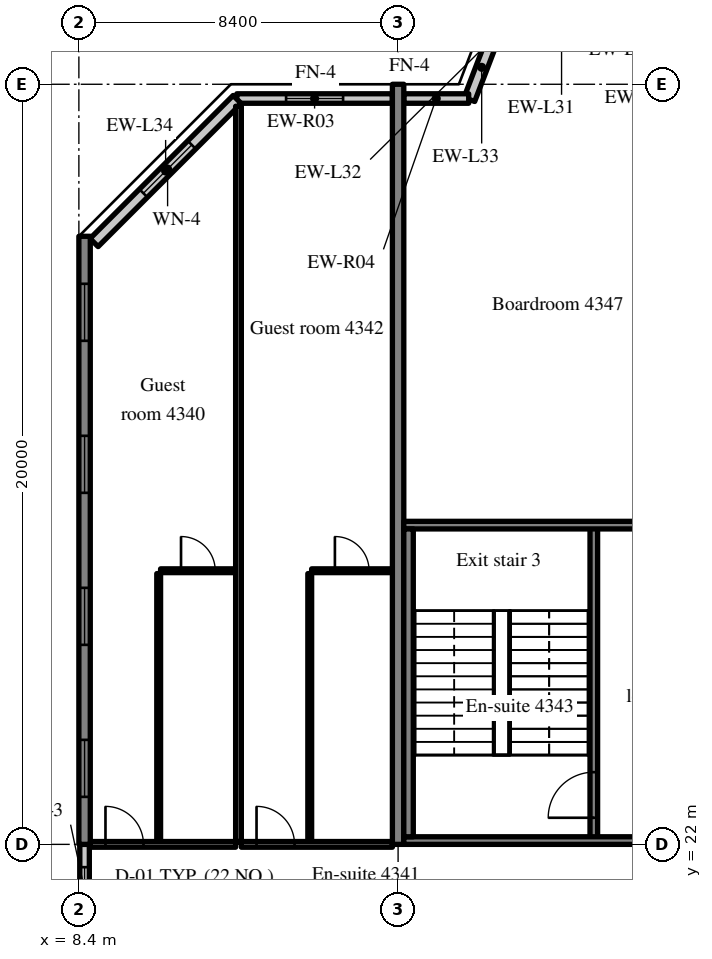
"""IFC4 building model, lengths in metres.
Left out: names, types, materials, properties, quantities, classifications, styles, units other than length and angle.
Written with IfcOpenShell. Run it as: python <this file> out.ifc"""

import sys

from ifc_helpers import new_model, si_unit, direction, frame, frame_2d, origin, place, context, subcontext, project, spatial, rectangle, extrude, source, transform, mapped, element, fill, save


model = new_model("IFC4")
c1 = context("Model", 3, precision=1e-05, world=origin(), true_north=direction((0.0, 1.0)))
c2 = subcontext(c1, "Body", "Model", "MODEL_VIEW")
j1 = project(units=[si_unit("LENGTHUNIT", "METRE"), si_unit("PLANEANGLEUNIT", "RADIAN")], contexts=[c1])
p1 = place(None, origin())
s1 = spatial("IfcSite", under=j1, at=p1, CompositionType="ELEMENT")
p2 = place(p1, origin())
s2 = spatial("IfcBuilding", under=s1, at=p2, CompositionType="ELEMENT")
p3 = place(p2, frame((0.0, 0.0, 178.2)))
s3 = spatial("IfcBuildingStorey", under=s2, at=p3, CompositionType="ELEMENT", Elevation=178.2)
m1 = source(origin(), c2, "Body", "SweptSolid", [
    extrude(rectangle(XDim=16.0, YDim=0.3, at=frame_2d((8.0, 0.0))), origin(), (0.0, 0.0, 1.0), 3.52),
])
p4 = place(p3, frame((8.55, 22.0, 0.0), z_axis=(0.0, 0.0, 1.0), x_axis=(0.0, 1.0, 0.0)))
e1 = element("IfcWall", 1, at=p4, inside=s3, PredefinedType="SHEAR", context=c2, shape_type="MappedRepresentation", body=[
    mapped(m1, transform((0.0, 0.0, 0.0), scale=1.0)),
])
m2 = source(origin(), c2, "Body", "SweptSolid", [
    extrude(rectangle(XDim=1.5, YDim=1.5, at=frame_2d((0.75, 0.75))), frame((0.0, 0.16, 0.0), z_axis=(0.0, -1.0, 0.0), x_axis=(1.0, 0.0, 0.0)), (0.0, 0.0, 1.0), 0.32),
])
p5 = place(p4, frame((1.25, 0.0, 0.9)))
e2 = element("IfcOpeningElement", 2, at=p5, cuts=e1, PredefinedType="OPENING", context=c2, shape_type="MappedRepresentation", body=[
    mapped(m2, transform((0.0, 0.0, 0.0), scale=1.0)),
])
p6 = place(p4, frame((5.25, 0.0, 0.9)))
e3 = element("IfcOpeningElement", 3, at=p6, cuts=e1, PredefinedType="OPENING", context=c2, shape_type="MappedRepresentation", body=[
    mapped(m2, transform((0.0, 0.0, 0.0), scale=1.0)),
])
p7 = place(p4, frame((9.25, 0.0, 0.9)))
e4 = element("IfcOpeningElement", 4, at=p7, cuts=e1, PredefinedType="OPENING", context=c2, shape_type="MappedRepresentation", body=[
    mapped(m2, transform((0.0, 0.0, 0.0), scale=1.0)),
])
p8 = place(p4, frame((13.25, 0.0, 0.9)))
e5 = element("IfcOpeningElement", 5, at=p8, cuts=e1, PredefinedType="OPENING", context=c2, shape_type="MappedRepresentation", body=[
    mapped(m2, transform((0.0, 0.0, 0.0), scale=1.0)),
])
m3 = source(origin(), c2, "Body", "SweptSolid", [
    extrude(rectangle(XDim=20.0, YDim=0.3, at=frame_2d((10.0, 0.0))), origin(), (0.0, 0.0, 1.0), 3.52),
])
p9 = place(p3, frame((16.8, 22.0, 0.0), z_axis=(0.0, 0.0, 1.0), x_axis=(0.0, 1.0, 0.0)))
e6 = element("IfcWall", 6, at=p9, inside=s3, PredefinedType="SHEAR", context=c2, shape_type="MappedRepresentation", body=[
    mapped(m3, transform((0.0, 0.0, 0.0), scale=1.0)),
])
m4 = source(origin(), c2, "Body", "SweptSolid", [
    extrude(rectangle(XDim=1.812, YDim=0.3, at=frame_2d((0.906, 0.0))), origin(), (0.0, 0.0, 1.0), 3.52),
])
p10 = place(p3, frame((19.323, 43.292, 0.0), z_axis=(0.0, 0.0, 1.0), x_axis=(-0.357877270961, -0.93376863244, 0.0)))
e7 = element("IfcWall", 7, at=p10, inside=s3, PredefinedType="SOLIDWALL", context=c2, shape_type="MappedRepresentation", body=[
    mapped(m4, transform((0.0, 0.0, 0.0), scale=1.0)),
])
m5 = source(origin(), c2, "Body", "SweptSolid", [
    extrude(rectangle(XDim=4.094, YDim=0.25, at=frame_2d((2.047, 0.0))), origin(), (0.0, 0.0, 1.0), 2.87),
])
p11 = place(p3, frame((16.65, 41.625, 0.0), z_axis=(0.0, 0.0, 1.0), x_axis=(-1.0, 0.0, 0.0)))
e8 = element("IfcWall", 8, at=p11, inside=s3, PredefinedType="SOLIDWALL", context=c2, shape_type="MappedRepresentation", body=[
    mapped(m5, transform((0.0, 0.0, 0.0), scale=1.0)),
])
m6 = source(origin(), c2, "Body", "SweptSolid", [
    extrude(rectangle(XDim=1.5, YDim=1.5, at=frame_2d((0.75, 0.75))), frame((0.0, 0.135, 0.0), z_axis=(0.0, -1.0, 0.0), x_axis=(1.0, 0.0, 0.0)), (0.0, 0.0, 1.0), 0.27),
])
p12 = place(p11, frame((1.297, 0.0, 0.9)))
e9 = element("IfcOpeningElement", 9, at=p12, cuts=e8, PredefinedType="OPENING", context=c2, shape_type="MappedRepresentation", body=[
    mapped(m6, transform((0.0, 0.0, 0.0), scale=1.0)),
])
m7 = source(origin(), c2, "Body", "SweptSolid", [
    extrude(rectangle(XDim=1.708, YDim=0.25, at=frame_2d((0.854, 0.0))), origin(), (0.0, 0.0, 1.0), 2.87),
])
p13 = place(p3, frame((18.658, 41.625, 0.0), z_axis=(0.0, 0.0, 1.0), x_axis=(-1.0, 0.0, 0.0)))
e10 = element("IfcWall", 10, at=p13, inside=s3, PredefinedType="SOLIDWALL", context=c2, shape_type="MappedRepresentation", body=[
    mapped(m7, transform((0.0, 0.0, 0.0), scale=1.0)),
])
m8 = source(origin(), c2, "Body", "SweptSolid", [
    extrude(rectangle(XDim=5.326, YDim=0.3, at=frame_2d((2.663, 0.0))), origin(), (0.0, 0.0, 1.0), 3.52),
])
p14 = place(p3, frame((12.566, 41.6, 0.0), z_axis=(0.0, 0.0, 1.0), x_axis=(-0.707083859269, -0.707129702361, 0.0)))
e11 = element("IfcWall", 11, at=p14, inside=s3, PredefinedType="SOLIDWALL", context=c2, shape_type="MappedRepresentation", body=[
    mapped(m8, transform((0.0, 0.0, 0.0), scale=1.0)),
])
m9 = source(origin(), c2, "Body", "SweptSolid", [
    extrude(rectangle(XDim=1.8, YDim=1.5, at=frame_2d((0.9, 0.75))), frame((0.0, 0.16, 0.0), z_axis=(0.0, -1.0, 0.0), x_axis=(1.0, 0.0, 0.0)), (0.0, 0.0, 1.0), 0.32),
])
p15 = place(p14, frame((1.689, 0.0, 0.9)))
e12 = element("IfcOpeningElement", 12, at=p15, cuts=e11, PredefinedType="OPENING", context=c2, shape_type="MappedRepresentation", body=[
    mapped(m9, transform((0.0, 0.0, 0.0), scale=1.0)),
])
m10 = source(origin(), c2, "Body", "SweptSolid", [
    extrude(rectangle(XDim=2.4, YDim=0.25, at=frame_2d((1.2, 0.0))), origin(), (0.0, 0.0, 1.0), 2.62),
])
p16 = place(p3, frame((8.55, 19.6, 0.0), z_axis=(0.0, 0.0, 1.0), x_axis=(0.0, 1.0, 0.0)))
e13 = element("IfcWall", 13, at=p16, inside=s3, PredefinedType="SOLIDWALL", context=c2, shape_type="MappedRepresentation", body=[
    mapped(m10, transform((0.0, 0.0, 0.0), scale=1.0)),
])
m11 = source(origin(), c2, "Body", "SweptSolid", [
    extrude(rectangle(XDim=1.2, YDim=1.5, at=frame_2d((0.6, 0.75))), frame((0.0, 0.135, 0.0), z_axis=(0.0, -1.0, 0.0), x_axis=(1.0, 0.0, 0.0)), (0.0, 0.0, 1.0), 0.27),
])
p17 = place(p16, frame((0.6, 0.0, 0.9)))
e14 = element("IfcOpeningElement", 14, at=p17, cuts=e13, PredefinedType="OPENING", context=c2, shape_type="MappedRepresentation", body=[
    mapped(m11, transform((0.0, 0.0, 0.0), scale=1.0)),
])
m12 = source(origin(), c2, "Body", "SweptSolid", [
    extrude(rectangle(XDim=8.3, YDim=0.2, at=frame_2d((4.15, 0.0))), origin(), (0.0, 0.0, 1.0), 3.52),
])
p18 = place(p3, frame((21.95, 22.1, 0.0), z_axis=(0.0, 0.0, 1.0), x_axis=(0.0, 1.0, 0.0)))
e15 = element("IfcWall", 15, at=p18, inside=s3, PredefinedType="SOLIDWALL", context=c2, shape_type="MappedRepresentation", body=[
    mapped(m12, transform((0.0, 0.0, 0.0), scale=1.0)),
])
m13 = source(origin(), c2, "Body", "SweptSolid", [
    extrude(rectangle(XDim=1.2, YDim=2.1, at=frame_2d((0.6, 1.05))), frame((0.0, 0.11, 0.0), z_axis=(0.0, -1.0, 0.0), x_axis=(1.0, 0.0, 0.0)), (0.0, 0.0, 1.0), 0.22),
])
p19 = place(p18, frame((0.6, 0.0, 0.0)))
e16 = element("IfcOpeningElement", 16, at=p19, cuts=e15, PredefinedType="OPENING", context=c2, shape_type="MappedRepresentation", body=[
    mapped(m13, transform((0.0, 0.0, 0.0), scale=1.0)),
])
m14 = source(origin(), c2, "Body", "SweptSolid", [
    extrude(rectangle(XDim=8.25, YDim=0.2, at=frame_2d((4.125, 0.0))), origin(), (0.0, 0.0, 1.0), 3.52),
])
p20 = place(p3, frame((16.95, 22.1, 0.0), z_axis=(0.0, 0.0, 1.0), x_axis=(1.0, 0.0, 0.0)))
e17 = element("IfcWall", 17, at=p20, inside=s3, PredefinedType="SOLIDWALL", context=c2, shape_type="MappedRepresentation", body=[
    mapped(m14, transform((0.0, 0.0, 0.0), scale=1.0)),
])
p21 = place(p20, frame((6.05, 0.0, 0.0)))
e18 = element("IfcOpeningElement", 18, at=p21, cuts=e17, PredefinedType="OPENING", context=c2, shape_type="MappedRepresentation", body=[
    mapped(m13, transform((0.0, 0.0, 0.0), scale=1.0)),
])
p22 = place(p3, frame((16.95, 30.4, 0.0), z_axis=(0.0, 0.0, 1.0), x_axis=(1.0, 0.0, 0.0)))
e19 = element("IfcWall", 19, at=p22, inside=s3, PredefinedType="SOLIDWALL", context=c2, shape_type="MappedRepresentation", body=[
    mapped(m14, transform((0.0, 0.0, 0.0), scale=1.0)),
])
m15 = source(origin(), c2, "Body", "SweptSolid", [
    extrude(rectangle(XDim=1.0, YDim=2.1, at=frame_2d((0.5, 1.05))), frame((0.0, 0.11, 0.0), z_axis=(0.0, -1.0, 0.0), x_axis=(1.0, 0.0, 0.0)), (0.0, 0.0, 1.0), 0.22),
])
p23 = place(p22, frame((6.15, 0.0, 0.0)))
e20 = element("IfcOpeningElement", 20, at=p23, cuts=e19, PredefinedType="OPENING", context=c2, shape_type="MappedRepresentation", body=[
    mapped(m15, transform((0.0, 0.0, 0.0), scale=1.0)),
])
m16 = source(origin(), c2, "Body", "SweptSolid", [
    extrude(rectangle(XDim=8.1, YDim=0.25, at=frame_2d((4.05, 0.0))), origin(), (0.0, 0.0, 1.0), 3.52),
])
p24 = place(p3, frame((17.075, 22.2, 0.0), z_axis=(0.0, 0.0, 1.0), x_axis=(0.0, 1.0, 0.0)))
e21 = element("IfcWall", 21, at=p24, inside=s3, PredefinedType="SOLIDWALL", context=c2, shape_type="MappedRepresentation", body=[
    mapped(m16, transform((0.0, 0.0, 0.0), scale=1.0)),
])
m17 = source(origin(), c2, "Body", "SweptSolid", [
    extrude(rectangle(XDim=7.05, YDim=0.1, at=frame_2d((3.525, 0.0))), origin(), (0.0, 0.0, 1.0), 3.52),
])
p25 = place(p3, frame((10.5, 22.075, 0.0), z_axis=(0.0, 0.0, 1.0), x_axis=(0.0, 1.0, 0.0)))
e22 = element("IfcWall", 22, at=p25, inside=s3, PredefinedType="PARTITIONING", context=c2, shape_type="MappedRepresentation", body=[
    mapped(m17, transform((0.0, 0.0, 0.0), scale=1.0)),
])
m18 = source(origin(), c2, "Body", "SweptSolid", [
    extrude(rectangle(XDim=1.975, YDim=0.1, at=frame_2d((0.987, 0.0))), origin(), (0.0, 0.0, 1.0), 3.52),
])
p26 = place(p3, frame((10.55, 29.2, 0.0), z_axis=(0.0, 0.0, 1.0), x_axis=(1.0, 0.0, 0.0)))
e23 = element("IfcWall", 23, at=p26, inside=s3, PredefinedType="PARTITIONING", context=c2, shape_type="MappedRepresentation", body=[
    mapped(m18, transform((0.0, 0.0, 0.0), scale=1.0)),
])
m19 = source(origin(), c2, "Body", "SweptSolid", [
    extrude(rectangle(XDim=0.9, YDim=2.1, at=frame_2d((0.45, 1.05))), frame((0.0, 0.06, 0.0), z_axis=(0.0, -1.0, 0.0), x_axis=(1.0, 0.0, 0.0)), (0.0, 0.0, 1.0), 0.12),
])
p27 = place(p26, frame((0.538, 0.0, 0.0)))
e24 = element("IfcOpeningElement", 24, at=p27, cuts=e23, PredefinedType="OPENING", context=c2, shape_type="MappedRepresentation", body=[
    mapped(m19, transform((0.0, 0.0, 0.0), scale=1.0)),
])
m20 = source(origin(), c2, "Body", "SweptSolid", [
    extrude(rectangle(XDim=3.825, YDim=0.15, at=frame_2d((1.913, 0.0))), origin(), (0.0, 0.0, 1.0), 2.82),
])
p28 = place(p3, frame((8.7, 22.0, 0.0), z_axis=(0.0, 0.0, 1.0), x_axis=(1.0, 0.0, 0.0)))
e25 = element("IfcWall", 25, at=p28, inside=s3, PredefinedType="PARTITIONING", context=c2, shape_type="MappedRepresentation", body=[
    mapped(m20, transform((0.0, 0.0, 0.0), scale=1.0)),
])
m21 = source(origin(), c2, "Body", "SweptSolid", [
    extrude(rectangle(XDim=1.0, YDim=2.1, at=frame_2d((0.5, 1.05))), frame((0.0, 0.085, 0.0), z_axis=(0.0, -1.0, 0.0), x_axis=(1.0, 0.0, 0.0)), (0.0, 0.0, 1.0), 0.17),
])
p29 = place(p28, frame((0.4, 0.0, 0.0)))
e26 = element("IfcOpeningElement", 26, at=p29, cuts=e25, PredefinedType="OPENING", context=c2, shape_type="MappedRepresentation", body=[
    mapped(m21, transform((0.0, 0.0, 0.0), scale=1.0)),
])
p30 = place(p3, frame((14.475, 22.075, 0.0), z_axis=(0.0, 0.0, 1.0), x_axis=(0.0, 1.0, 0.0)))
e27 = element("IfcWall", 27, at=p30, inside=s3, PredefinedType="PARTITIONING", context=c2, shape_type="MappedRepresentation", body=[
    mapped(m17, transform((0.0, 0.0, 0.0), scale=1.0)),
])
m22 = source(origin(), c2, "Body", "SweptSolid", [
    extrude(rectangle(XDim=2.125, YDim=0.1, at=frame_2d((1.062, 0.0))), origin(), (0.0, 0.0, 1.0), 3.52),
])
p31 = place(p3, frame((14.525, 29.2, 0.0), z_axis=(0.0, 0.0, 1.0), x_axis=(1.0, 0.0, 0.0)))
e28 = element("IfcWall", 28, at=p31, inside=s3, PredefinedType="PARTITIONING", context=c2, shape_type="MappedRepresentation", body=[
    mapped(m22, transform((0.0, 0.0, 0.0), scale=1.0)),
])
p32 = place(p31, frame((0.612, 0.0, 0.0)))
e29 = element("IfcOpeningElement", 29, at=p32, cuts=e28, PredefinedType="OPENING", context=c2, shape_type="MappedRepresentation", body=[
    mapped(m19, transform((0.0, 0.0, 0.0), scale=1.0)),
])
m23 = source(origin(), c2, "Body", "SweptSolid", [
    extrude(rectangle(XDim=3.975, YDim=0.15, at=frame_2d((1.987, 0.0))), origin(), (0.0, 0.0, 1.0), 2.82),
])
p33 = place(p3, frame((12.675, 22.0, 0.0), z_axis=(0.0, 0.0, 1.0), x_axis=(1.0, 0.0, 0.0)))
e30 = element("IfcWall", 30, at=p33, inside=s3, PredefinedType="PARTITIONING", context=c2, shape_type="MappedRepresentation", body=[
    mapped(m23, transform((0.0, 0.0, 0.0), scale=1.0)),
])
p34 = place(p33, frame((0.4, 0.0, 0.0)))
e31 = element("IfcOpeningElement", 31, at=p34, cuts=e30, PredefinedType="OPENING", context=c2, shape_type="MappedRepresentation", body=[
    mapped(m21, transform((0.0, 0.0, 0.0), scale=1.0)),
])
m24 = source(origin(), c2, "Body", "SweptSolid", [
    extrude(rectangle(XDim=19.347, YDim=0.15, at=frame_2d((9.674, 0.0))), origin(), (0.0, 0.0, 1.0), 3.52),
])
p35 = place(p3, frame((12.6, 22.075, 0.0), z_axis=(0.0, 0.0, 1.0), x_axis=(0.0, 1.0, 0.0)))
e32 = element("IfcWall", 32, at=p35, inside=s3, PredefinedType="PARTITIONING", context=c2, shape_type="MappedRepresentation", body=[
    mapped(m24, transform((0.0, 0.0, 0.0), scale=1.0)),
])
m25 = source(origin(), c2, "Body", "SweptSolid", [
    extrude(rectangle(XDim=1.5, YDim=1.5, at=frame_2d((0.75, 0.75))), frame((0.0, 0.03, 0.0), z_axis=(0.0, -1.0, 0.0), x_axis=(1.0, 0.0, 0.0)), (0.0, 0.0, 1.0), 0.06),
])
p36 = place(p12, origin())
e33 = element("IfcWindow", 33, at=p36, inside=s3, PartitioningType="SINGLE_PANEL", PredefinedType="WINDOW", context=c2, shape_type="MappedRepresentation", body=[
    mapped(m25, transform((0.0, 0.0, 0.0), scale=1.0)),
])
fill(e9, e33)
m26 = source(origin(), c2, "Body", "SweptSolid", [
    extrude(rectangle(XDim=1.8, YDim=1.5, at=frame_2d((0.9, 0.75))), frame((0.0, 0.03, 0.0), z_axis=(0.0, -1.0, 0.0), x_axis=(1.0, 0.0, 0.0)), (0.0, 0.0, 1.0), 0.06),
])
p37 = place(p15, origin())
e34 = element("IfcWindow", 34, at=p37, inside=s3, PartitioningType="SINGLE_PANEL", PredefinedType="WINDOW", context=c2, shape_type="MappedRepresentation", body=[
    mapped(m26, transform((0.0, 0.0, 0.0), scale=1.0)),
])
fill(e12, e34)
p38 = place(p5, origin())
e35 = element("IfcWindow", 35, at=p38, inside=s3, PartitioningType="SINGLE_PANEL", PredefinedType="WINDOW", context=c2, shape_type="MappedRepresentation", body=[
    mapped(m25, transform((0.0, 0.0, 0.0), scale=1.0)),
])
fill(e2, e35)
p39 = place(p6, origin())
e36 = element("IfcWindow", 36, at=p39, inside=s3, PartitioningType="SINGLE_PANEL", PredefinedType="WINDOW", context=c2, shape_type="MappedRepresentation", body=[
    mapped(m25, transform((0.0, 0.0, 0.0), scale=1.0)),
])
fill(e3, e36)
p40 = place(p7, origin())
e37 = element("IfcWindow", 37, at=p40, inside=s3, PartitioningType="SINGLE_PANEL", PredefinedType="WINDOW", context=c2, shape_type="MappedRepresentation", body=[
    mapped(m25, transform((0.0, 0.0, 0.0), scale=1.0)),
])
fill(e4, e37)
p41 = place(p8, origin())
e38 = element("IfcWindow", 38, at=p41, inside=s3, PartitioningType="SINGLE_PANEL", PredefinedType="WINDOW", context=c2, shape_type="MappedRepresentation", body=[
    mapped(m25, transform((0.0, 0.0, 0.0), scale=1.0)),
])
fill(e5, e38)
m27 = source(origin(), c2, "Body", "SweptSolid", [
    extrude(rectangle(XDim=1.2, YDim=1.5, at=frame_2d((0.6, 0.75))), frame((0.0, 0.03, 0.0), z_axis=(0.0, -1.0, 0.0), x_axis=(1.0, 0.0, 0.0)), (0.0, 0.0, 1.0), 0.06),
])
p42 = place(p17, origin())
e39 = element("IfcWindow", 39, at=p42, inside=s3, PartitioningType="SINGLE_PANEL", PredefinedType="WINDOW", context=c2, shape_type="MappedRepresentation", body=[
    mapped(m27, transform((0.0, 0.0, 0.0), scale=1.0)),
])
fill(e14, e39)
m28 = source(origin(), c2, "Body", "SweptSolid", [
    extrude(rectangle(XDim=1.2, YDim=2.1, at=frame_2d((0.6, 1.05))), frame((0.0, 0.025, 0.0), z_axis=(0.0, -1.0, 0.0), x_axis=(1.0, 0.0, 0.0)), (0.0, 0.0, 1.0), 0.05),
])
p43 = place(p19, origin())
e40 = element("IfcDoor", 40, at=p43, inside=s3, OperationType="SINGLE_SWING_LEFT", PredefinedType="DOOR", context=c2, shape_type="MappedRepresentation", body=[
    mapped(m28, transform((0.0, 0.0, 0.0), scale=1.0)),
])
fill(e16, e40)
m29 = source(origin(), c2, "Body", "SweptSolid", [
    extrude(rectangle(XDim=0.9, YDim=2.1, at=frame_2d((0.45, 1.05))), frame((0.0, 0.025, 0.0), z_axis=(0.0, -1.0, 0.0), x_axis=(1.0, 0.0, 0.0)), (0.0, 0.0, 1.0), 0.05),
])
p44 = place(p27, origin())
e41 = element("IfcDoor", 41, at=p44, inside=s3, OperationType="SINGLE_SWING_LEFT", PredefinedType="DOOR", context=c2, shape_type="MappedRepresentation", body=[
    mapped(m29, transform((0.0, 0.0, 0.0), scale=1.0)),
])
fill(e24, e41)
m30 = source(origin(), c2, "Body", "SweptSolid", [
    extrude(rectangle(XDim=1.0, YDim=2.1, at=frame_2d((0.5, 1.05))), frame((0.0, 0.025, 0.0), z_axis=(0.0, -1.0, 0.0), x_axis=(1.0, 0.0, 0.0)), (0.0, 0.0, 1.0), 0.05),
])
p45 = place(p29, origin())
e42 = element("IfcDoor", 42, at=p45, inside=s3, OperationType="SINGLE_SWING_LEFT", PredefinedType="DOOR", context=c2, shape_type="MappedRepresentation", body=[
    mapped(m30, transform((0.0, 0.0, 0.0), scale=1.0)),
])
fill(e26, e42)
p46 = place(p32, origin())
e43 = element("IfcDoor", 43, at=p46, inside=s3, OperationType="SINGLE_SWING_LEFT", PredefinedType="DOOR", context=c2, shape_type="MappedRepresentation", body=[
    mapped(m29, transform((0.0, 0.0, 0.0), scale=1.0)),
])
fill(e29, e43)
p47 = place(p34, origin())
e44 = element("IfcDoor", 44, at=p47, inside=s3, OperationType="SINGLE_SWING_LEFT", PredefinedType="DOOR", context=c2, shape_type="MappedRepresentation", body=[
    mapped(m30, transform((0.0, 0.0, 0.0), scale=1.0)),
])
fill(e31, e44)
save(model, sys.argv[1])
